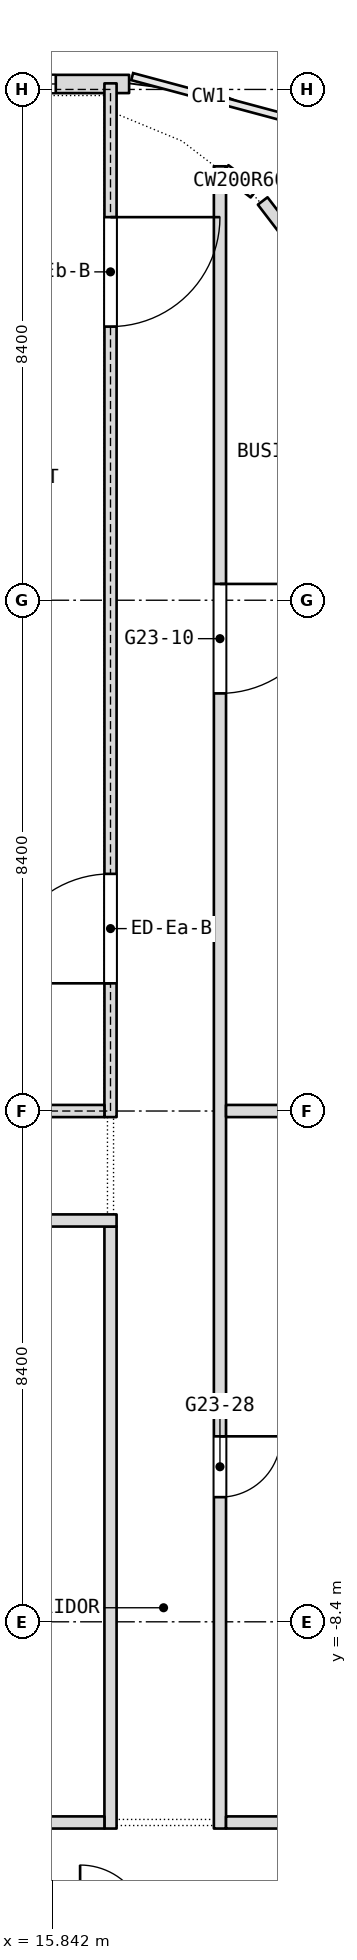
"""IFC4 building model, lengths in metres.
Left out: names, types, materials, properties, quantities, classifications, styles, units other than length and angle.
Written with IfcOpenShell. Run it as: python <this file> out.ifc"""

import sys

from ifc_helpers import new_model, si_unit, direction, frame, frame_2d, origin, place, context, subcontext, project, spatial, rectangle, extrude, element, fill, save


model = new_model("IFC4")
c1 = context("Model", 3, precision=1e-05, world=origin(), true_north=direction((0.0, 1.0)))
c2 = subcontext(c1, "Body", "Model", "MODEL_VIEW")
j1 = project(units=[si_unit("LENGTHUNIT", "METRE"), si_unit("PLANEANGLEUNIT", "RADIAN")], contexts=[c1])
p1 = place(None, origin())
s1 = spatial("IfcSite", under=j1, at=p1, CompositionType="ELEMENT")
p2 = place(p1, origin())
s2 = spatial("IfcBuilding", under=s1, at=p2, CompositionType="ELEMENT")
p3 = place(p2, frame((0.0, 0.0, 274.1)))
s3 = spatial("IfcBuildingStorey", under=s2, at=p3, CompositionType="ELEMENT", Elevation=274.1)
p4 = place(p3, frame((18.6, -11.8, 0.0), z_axis=(0.0, 0.0, 1.0), x_axis=(0.0, 1.0, 0.0)))
e1 = element("IfcWall", 1, at=p4, inside=s3, PredefinedType="PARTITIONING", context=c2, shape_type="SweptSolid", body=[
    extrude(rectangle(XDim=27.336, YDim=0.2, at=frame_2d((13.668, 0.0))), origin(), (0.0, 0.0, 1.0), 3.34),
])
p5 = place(p4, frame((18.668, 0.0, 0.0)))
e2 = element("IfcOpeningElement", 2, at=p5, cuts=e1, PredefinedType="OPENING", context=c2, shape_type="SweptSolid", body=[
    extrude(rectangle(XDim=1.8, YDim=2.1, at=frame_2d((0.9, 1.05))), frame((0.0, 0.1, 0.0), z_axis=(0.0, -1.0, 0.0), x_axis=(1.0, 0.0, 0.0)), (0.0, 0.0, 1.0), 0.2),
])
p6 = place(p4, frame((5.45, 0.0, 0.0)))
e3 = element("IfcOpeningElement", 3, at=p6, cuts=e1, PredefinedType="OPENING", context=c2, shape_type="SweptSolid", body=[
    extrude(rectangle(XDim=1.0, YDim=2.1, at=frame_2d((0.5, 1.05))), frame((0.0, 0.1, 0.0), z_axis=(0.0, -1.0, 0.0), x_axis=(1.0, 0.0, 0.0)), (0.0, 0.0, 1.0), 0.2),
])
p7 = place(p3, frame((16.8, -11.8, 0.0), z_axis=(0.0, 0.0, 1.0), x_axis=(0.0, 1.0, 0.0)))
e4 = element("IfcWall", 4, at=p7, inside=s3, PredefinedType="PARTITIONING", context=c2, shape_type="SweptSolid", body=[
    extrude(rectangle(XDim=9.9, YDim=0.2, at=frame_2d((4.95, 0.0))), origin(), (0.0, 0.0, 1.0), 3.34),
])
p8 = place(p3, frame((-8.3, -11.7, 0.0), z_axis=(0.0, 0.0, 1.0), x_axis=(1.0, 0.0, 0.0)))
e5 = element("IfcWall", 5, at=p8, inside=s3, PredefinedType="PARTITIONING", context=c2, shape_type="SweptSolid", body=[
    extrude(rectangle(XDim=25.0, YDim=0.2, at=frame_2d((12.5, 0.0))), origin(), (0.0, 0.0, 1.0), 3.34),
])
p9 = place(p3, frame((18.7, -11.7, 0.0), z_axis=(0.0, 0.0, 1.0), x_axis=(1.0, 0.0, 0.0)))
e6 = element("IfcWall", 6, at=p9, inside=s3, PredefinedType="PARTITIONING", context=c2, shape_type="SweptSolid", body=[
    extrude(rectangle(XDim=2.3, YDim=0.2, at=frame_2d((1.15, 0.0))), origin(), (0.0, 0.0, 1.0), 3.34),
])
p10 = place(p3, frame((-16.9, -1.8, 0.0), z_axis=(0.0, 0.0, 1.0), x_axis=(1.0, 0.0, 0.0)))
e7 = element("IfcWall", 7, at=p10, inside=s3, PredefinedType="PARTITIONING", context=c2, shape_type="SweptSolid", body=[
    extrude(rectangle(XDim=33.8, YDim=0.2, at=frame_2d((16.9, 0.0))), origin(), (0.0, 0.0, 1.0), 3.34),
])
p11 = place(p10, frame((1.7, 0.0, 0.0)))
e8 = element("IfcOpeningElement", 8, at=p11, cuts=e7, PredefinedType="OPENING", context=c2, shape_type="SweptSolid", body=[
    extrude(rectangle(XDim=1.0, YDim=2.1, at=frame_2d((0.5, 1.05))), frame((0.0, 0.1, 0.0), z_axis=(0.0, -1.0, 0.0), x_axis=(1.0, 0.0, 0.0)), (0.0, 0.0, 1.0), 0.2),
])
p12 = place(p10, frame((5.9, 0.0, 0.0)))
e9 = element("IfcOpeningElement", 9, at=p12, cuts=e7, PredefinedType="OPENING", context=c2, shape_type="SweptSolid", body=[
    extrude(rectangle(XDim=1.0, YDim=2.1, at=frame_2d((0.5, 1.05))), frame((0.0, 0.1, 0.0), z_axis=(0.0, -1.0, 0.0), x_axis=(1.0, 0.0, 0.0)), (0.0, 0.0, 1.0), 0.2),
])
p13 = place(p10, frame((10.1, 0.0, 0.0)))
e10 = element("IfcOpeningElement", 10, at=p13, cuts=e7, PredefinedType="OPENING", context=c2, shape_type="SweptSolid", body=[
    extrude(rectangle(XDim=1.0, YDim=2.1, at=frame_2d((0.5, 1.05))), frame((0.0, 0.1, 0.0), z_axis=(0.0, -1.0, 0.0), x_axis=(1.0, 0.0, 0.0)), (0.0, 0.0, 1.0), 0.2),
])
p14 = place(p10, frame((16.0, 0.0, 0.0)))
e11 = element("IfcOpeningElement", 11, at=p14, cuts=e7, PredefinedType="OPENING", context=c2, shape_type="SweptSolid", body=[
    extrude(rectangle(XDim=1.8, YDim=2.1, at=frame_2d((0.9, 1.05))), frame((0.0, 0.1, 0.0), z_axis=(0.0, -1.0, 0.0), x_axis=(1.0, 0.0, 0.0)), (0.0, 0.0, 1.0), 0.2),
])
p15 = place(p10, frame((22.7, 0.0, 0.0)))
e12 = element("IfcOpeningElement", 12, at=p15, cuts=e7, PredefinedType="OPENING", context=c2, shape_type="SweptSolid", body=[
    extrude(rectangle(XDim=1.0, YDim=2.1, at=frame_2d((0.5, 1.05))), frame((0.0, 0.1, 0.0), z_axis=(0.0, -1.0, 0.0), x_axis=(1.0, 0.0, 0.0)), (0.0, 0.0, 1.0), 0.2),
])
p16 = place(p10, frame((26.9, 0.0, 0.0)))
e13 = element("IfcOpeningElement", 13, at=p16, cuts=e7, PredefinedType="OPENING", context=c2, shape_type="SweptSolid", body=[
    extrude(rectangle(XDim=1.0, YDim=2.1, at=frame_2d((0.5, 1.05))), frame((0.0, 0.1, 0.0), z_axis=(0.0, -1.0, 0.0), x_axis=(1.0, 0.0, 0.0)), (0.0, 0.0, 1.0), 0.2),
])
p17 = place(p10, frame((31.1, 0.0, 0.0)))
e14 = element("IfcOpeningElement", 14, at=p17, cuts=e7, PredefinedType="OPENING", context=c2, shape_type="SweptSolid", body=[
    extrude(rectangle(XDim=1.0, YDim=2.1, at=frame_2d((0.5, 1.05))), frame((0.0, 0.1, 0.0), z_axis=(0.0, -1.0, 0.0), x_axis=(1.0, 0.0, 0.0)), (0.0, 0.0, 1.0), 0.2),
])
p18 = place(p3, frame((18.7, 0.0, 0.0), z_axis=(0.0, 0.0, 1.0), x_axis=(1.0, 0.0, 0.0)))
e15 = element("IfcWall", 15, at=p18, inside=s3, PredefinedType="PARTITIONING", context=c2, shape_type="SweptSolid", body=[
    extrude(rectangle(XDim=2.3, YDim=0.2, at=frame_2d((1.15, 0.0))), origin(), (0.0, 0.0, 1.0), 3.0),
])
p19 = place(p3, frame((18.679, 15.475, 0.0), z_axis=(0.0, 0.0, 1.0), x_axis=(0.794663000987, -0.607050833837, 0.0)))
e16 = element("IfcWall", 16, at=p19, inside=s3, PredefinedType="PARTITIONING", context=c2, shape_type="SweptSolid", body=[
    extrude(rectangle(XDim=0.613, YDim=0.2, at=frame_2d((0.306, 0.0))), origin(), (0.0, 0.0, 1.0), 3.34),
])
p20 = place(p3, frame((19.303, 14.966, 0.0), z_axis=(0.0, 0.0, 1.0), x_axis=(0.607458536541, -0.794351387223, 0.0)))
e17 = element("IfcWall", 17, at=p20, inside=s3, PredefinedType="PARTITIONING", context=c2, shape_type="SweptSolid", body=[
    extrude(rectangle(XDim=1.075, YDim=0.2, at=frame_2d((0.538, 0.0))), origin(), (0.0, 0.0, 1.0), 3.34),
])
p21 = place(p3, frame((17.106, 16.89, 0.0), z_axis=(0.0, 0.0, 1.0), x_axis=(-1.0, 0.0, 0.0)))
e18 = element("IfcWall", 18, at=p21, inside=s3, PredefinedType="NOTDEFINED", context=c2, shape_type="SweptSolid", body=[
    extrude(rectangle(XDim=4.506, YDim=0.3, at=frame_2d((2.253, 0.0))), origin(), (0.0, 0.0, 1.0), 3.6),
])
p22 = place(p21, frame((1.206, 0.0, 0.9)))
e19 = element("IfcOpeningElement", 19, at=p22, cuts=e18, PredefinedType="OPENING", context=c2, shape_type="SweptSolid", body=[
    extrude(rectangle(XDim=2.4, YDim=2.1, at=frame_2d((1.2, 1.05))), frame((0.0, 0.15, 0.0), z_axis=(0.0, -1.0, 0.0), x_axis=(1.0, 0.0, 0.0)), (0.0, 0.0, 1.0), 0.3),
])
p23 = place(p3, frame((16.8, -0.1, 0.0), z_axis=(0.0, 0.0, 1.0), x_axis=(0.0, 1.0, 0.0)))
e20 = element("IfcWall", 20, at=p23, inside=s3, PredefinedType="PARTITIONING", context=c2, shape_type="SweptSolid", body=[
    extrude(rectangle(XDim=17.0, YDim=0.2, at=frame_2d((8.5, 0.0))), origin(), (0.0, 0.0, 1.0), 3.34),
])
p24 = place(p23, frame((2.2, 0.0, 0.0)))
e21 = element("IfcOpeningElement", 21, at=p24, cuts=e20, PredefinedType="OPENING", context=c2, shape_type="SweptSolid", body=[
    extrude(rectangle(XDim=1.8, YDim=2.1, at=frame_2d((0.9, 1.05))), frame((0.0, 0.1, 0.0), z_axis=(0.0, -1.0, 0.0), x_axis=(1.0, 0.0, 0.0)), (0.0, 0.0, 1.0), 0.2),
])
p25 = place(p23, frame((13.0, 0.0, 0.0)))
e22 = element("IfcOpeningElement", 22, at=p25, cuts=e20, PredefinedType="OPENING", context=c2, shape_type="SweptSolid", body=[
    extrude(rectangle(XDim=1.8, YDim=2.1, at=frame_2d((0.9, 1.05))), frame((0.0, 0.1, 0.0), z_axis=(0.0, -1.0, 0.0), x_axis=(1.0, 0.0, 0.0)), (0.0, 0.0, 1.0), 0.2),
])
p26 = place(p3, frame((11.7, 0.0, 0.0), z_axis=(0.0, 0.0, 1.0), x_axis=(1.0, 0.0, 0.0)))
e23 = element("IfcWall", 23, at=p26, inside=s3, PredefinedType="PARTITIONING", context=c2, shape_type="SweptSolid", body=[
    extrude(rectangle(XDim=5.0, YDim=0.2, at=frame_2d((2.5, 0.0))), origin(), (0.0, 0.0, 1.0), 3.0),
])
p27 = place(p5, origin())
e24 = element("IfcDoor", 24, at=p27, inside=s3, OperationType="DOUBLE_DOOR_SINGLE_SWING", PredefinedType="DOOR", context=c2, shape_type="SweptSolid", body=[
    extrude(rectangle(XDim=1.8, YDim=2.1, at=frame_2d((0.9, 1.05))), frame((0.0, 0.025, 0.0), z_axis=(0.0, -1.0, 0.0), x_axis=(1.0, 0.0, 0.0)), (0.0, 0.0, 1.0), 0.05),
])
fill(e2, e24)
p28 = place(p6, origin())
e25 = element("IfcDoor", 25, at=p28, inside=s3, OperationType="SINGLE_SWING_LEFT", PredefinedType="DOOR", context=c2, shape_type="SweptSolid", body=[
    extrude(rectangle(XDim=1.0, YDim=2.1, at=frame_2d((0.5, 1.05))), frame((0.0, 0.025, 0.0), z_axis=(0.0, -1.0, 0.0), x_axis=(1.0, 0.0, 0.0)), (0.0, 0.0, 1.0), 0.05),
])
fill(e3, e25)
p29 = place(p22, origin())
e26 = element("IfcWindow", 26, at=p29, inside=s3, PartitioningType="SINGLE_PANEL", PredefinedType="WINDOW", context=c2, shape_type="SweptSolid", body=[
    extrude(rectangle(XDim=2.4, YDim=2.1, at=frame_2d((1.2, 1.05))), frame((0.0, 0.03, 0.0), z_axis=(0.0, -1.0, 0.0), x_axis=(1.0, 0.0, 0.0)), (0.0, 0.0, 1.0), 0.06),
])
fill(e19, e26)
p30 = place(p24, origin())
e27 = element("IfcDoor", 27, at=p30, inside=s3, OperationType="DOUBLE_DOOR_SINGLE_SWING", PredefinedType="DOOR", context=c2, shape_type="SweptSolid", body=[
    extrude(rectangle(XDim=1.8, YDim=2.1, at=frame_2d((0.9, 1.05))), frame((0.0, 0.025, 0.0), z_axis=(0.0, -1.0, 0.0), x_axis=(1.0, 0.0, 0.0)), (0.0, 0.0, 1.0), 0.05),
])
fill(e21, e27)
p31 = place(p25, origin())
e28 = element("IfcDoor", 28, at=p31, inside=s3, OperationType="DOUBLE_DOOR_SINGLE_SWING", PredefinedType="DOOR", context=c2, shape_type="SweptSolid", body=[
    extrude(rectangle(XDim=1.8, YDim=2.1, at=frame_2d((0.9, 1.05))), frame((0.0, 0.025, 0.0), z_axis=(0.0, -1.0, 0.0), x_axis=(1.0, 0.0, 0.0)), (0.0, 0.0, 1.0), 0.05),
])
fill(e22, e28)
save(model, sys.argv[1])
